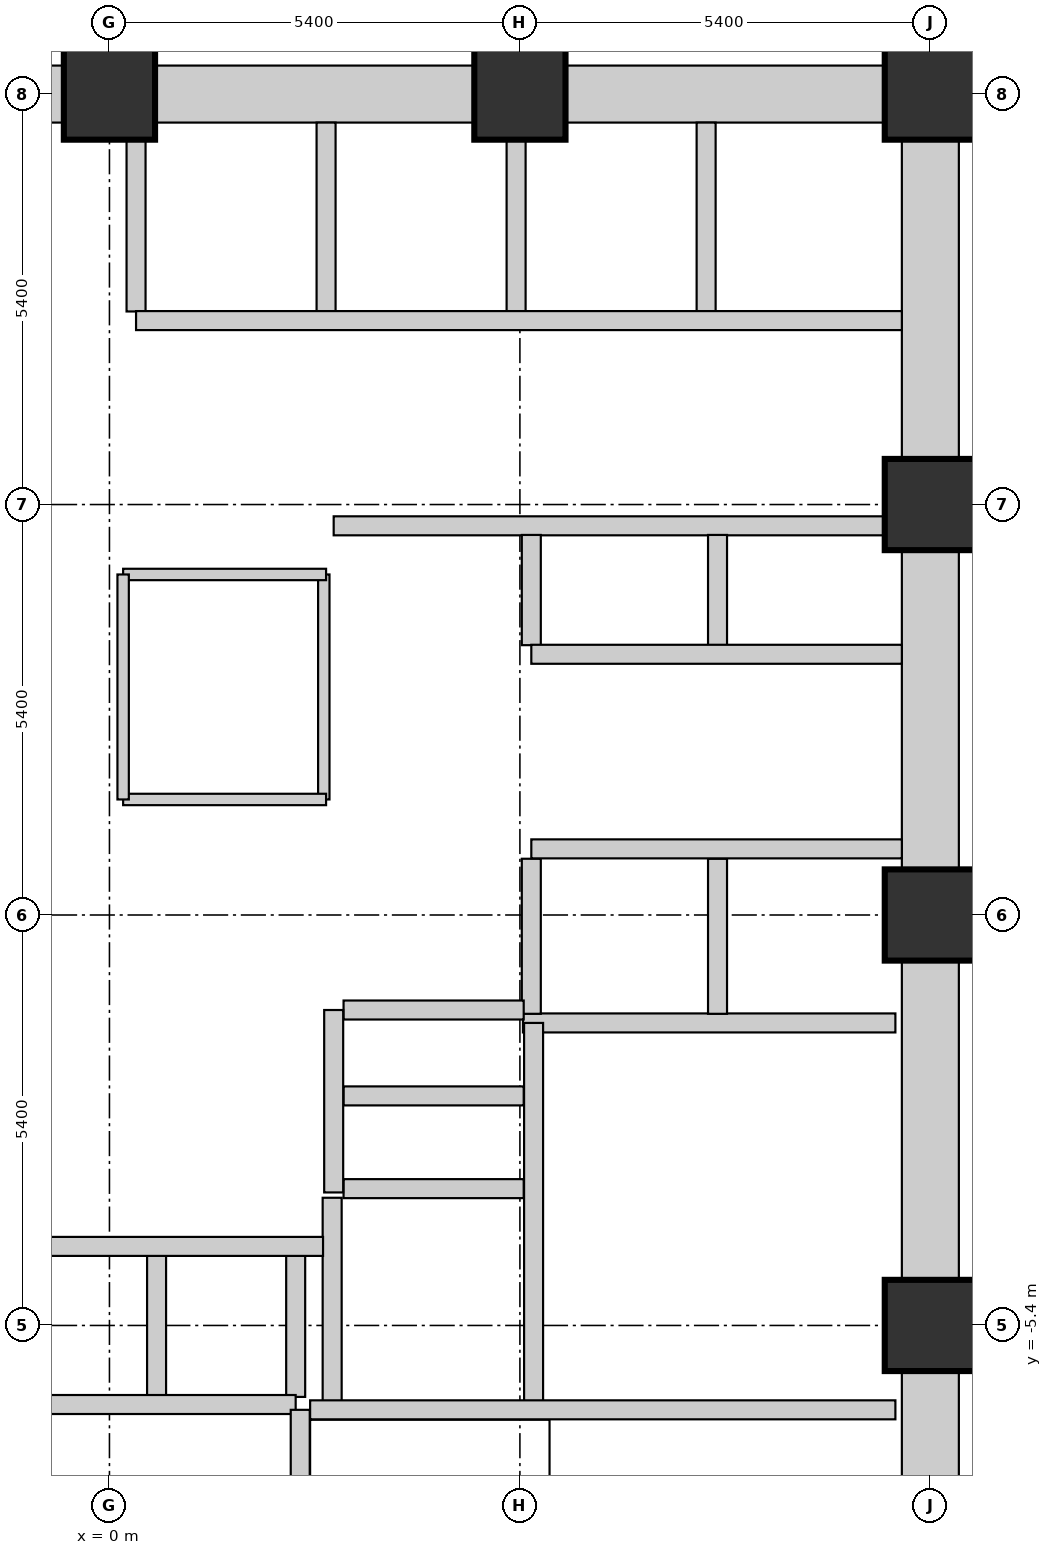
"""IFC4 building model, lengths in metres.
Left out: names, types, materials, properties, quantities, classifications, styles, units other than length and angle.
Written with IfcOpenShell. Run it as: python <this file> out.ifc"""

import sys

from ifc_helpers import new_model, si_unit, direction, frame, frame_2d, origin, origin_2d, place, context, subcontext, project, spatial, rectangle, extrude, element, fill, save


model = new_model("IFC4")
c1 = context("Model", 3, precision=1e-05, world=origin(), true_north=direction((0.0, 1.0)))
c2 = subcontext(c1, "Body", "Model", "MODEL_VIEW")
j1 = project(units=[si_unit("LENGTHUNIT", "METRE"), si_unit("PLANEANGLEUNIT", "RADIAN")], contexts=[c1])
p1 = place(None, origin())
s1 = spatial("IfcSite", under=j1, at=p1, CompositionType="ELEMENT")
p2 = place(p1, origin())
s2 = spatial("IfcBuilding", under=s1, at=p2, CompositionType="ELEMENT")
p3 = place(p2, frame((0.0, 0.0, 22.5)))
s3 = spatial("IfcBuildingStorey", under=s2, at=p3, CompositionType="ELEMENT", Elevation=22.5)
for number, where, z_axis, x_axis in (
    (1, (0.0, 10.8, 0.0), (0.0, 0.0, 1.0), (1.0, 0.0, 0.0)),
    (2, (5.4, 10.8, 0.0), (0.0, 0.0, 1.0), (1.0, 0.0, 0.0)),
    (3, (10.8, -5.4, 0.0), (0.0, 0.0, 1.0), (1.0, 0.0, 0.0)),
    (4, (10.8, 0.0, 0.0), (0.0, 0.0, 1.0), (1.0, 0.0, 0.0)),
    (5, (10.8, 5.4, 0.0), (0.0, 0.0, 1.0), (1.0, 0.0, 0.0)),
    (6, (10.8, 10.8, 0.0), (0.0, 0.0, 1.0), (1.0, 0.0, 0.0)),
):
    element("IfcColumn", number, at=place(p3, frame(where, z_axis=z_axis, x_axis=x_axis)), inside=s3, PredefinedType="COLUMN", context=c2, shape_type="SweptSolid", body=[
        extrude(rectangle(XDim=1.2, YDim=1.2, at=origin_2d()), origin(), (0.0, 0.0, 1.0), 3.75),
    ])
p4 = place(p3, frame((10.8, -10.19, 0.0), z_axis=(0.0, 0.0, 1.0), x_axis=(0.0, 1.0, 0.0)))
e7 = element("IfcWall", 7, at=p4, inside=s3, PredefinedType="SHEAR", context=c2, shape_type="SweptSolid", body=[
    extrude(rectangle(XDim=4.18, YDim=0.75, at=frame_2d((2.09, 0.0))), origin(), (0.0, 0.0, 1.0), 3.75),
])
p5 = place(p3, frame((-4.79, 10.8, 0.0), z_axis=(0.0, 0.0, 1.0), x_axis=(1.0, 0.0, 0.0)))
e8 = element("IfcWall", 8, at=p5, inside=s3, PredefinedType="SHEAR", context=c2, shape_type="SweptSolid", body=[
    extrude(rectangle(XDim=4.18, YDim=0.75, at=frame_2d((2.09, 0.0))), origin(), (0.0, 0.0, 1.0), 3.75),
])
p6 = place(p5, frame((2.83, 0.0, 0.0)))
e9 = element("IfcOpeningElement", 9, at=p6, cuts=e8, PredefinedType="OPENING", context=c2, shape_type="SweptSolid", body=[
    extrude(rectangle(XDim=1.1, YDim=2.1, at=frame_2d((0.55, 1.05))), frame((0.0, 0.385, 0.0), z_axis=(0.0, -1.0, 0.0), x_axis=(1.0, 0.0, 0.0)), (0.0, 0.0, 1.0), 0.77),
])
p7 = place(p3, frame((10.8, -4.79, 0.0), z_axis=(0.0, 0.0, 1.0), x_axis=(0.0, 1.0, 0.0)))
e10 = element("IfcWall", 10, at=p7, inside=s3, PredefinedType="SHEAR", context=c2, shape_type="SweptSolid", body=[
    extrude(rectangle(XDim=4.18, YDim=0.75, at=frame_2d((2.09, 0.0))), origin(), (0.0, 0.0, 1.0), 3.75),
])
p8 = place(p7, frame((1.54, 0.0, 0.0)))
e11 = element("IfcOpeningElement", 11, at=p8, cuts=e10, PredefinedType="OPENING", context=c2, shape_type="SweptSolid", body=[
    extrude(rectangle(XDim=1.1, YDim=2.1, at=frame_2d((0.55, 1.05))), frame((0.0, 0.385, 0.0), z_axis=(0.0, -1.0, 0.0), x_axis=(1.0, 0.0, 0.0)), (0.0, 0.0, 1.0), 0.77),
])
p9 = place(p3, frame((0.61, 10.8, 0.0), z_axis=(0.0, 0.0, 1.0), x_axis=(1.0, 0.0, 0.0)))
e12 = element("IfcWall", 12, at=p9, inside=s3, PredefinedType="SHEAR", context=c2, shape_type="SweptSolid", body=[
    extrude(rectangle(XDim=4.18, YDim=0.75, at=frame_2d((2.09, 0.0))), origin(), (0.0, 0.0, 1.0), 3.75),
])
p10 = place(p3, frame((10.8, 0.61, 0.0), z_axis=(0.0, 0.0, 1.0), x_axis=(0.0, 1.0, 0.0)))
e13 = element("IfcWall", 13, at=p10, inside=s3, PredefinedType="SHEAR", context=c2, shape_type="SweptSolid", body=[
    extrude(rectangle(XDim=4.18, YDim=0.75, at=frame_2d((2.09, 0.0))), origin(), (0.0, 0.0, 1.0), 3.75),
])
p11 = place(p10, frame((1.54, 0.0, 0.0)))
e14 = element("IfcOpeningElement", 14, at=p11, cuts=e13, PredefinedType="OPENING", context=c2, shape_type="SweptSolid", body=[
    extrude(rectangle(XDim=1.1, YDim=2.1, at=frame_2d((0.55, 1.05))), frame((0.0, 0.385, 0.0), z_axis=(0.0, -1.0, 0.0), x_axis=(1.0, 0.0, 0.0)), (0.0, 0.0, 1.0), 0.77),
])
for number, where, z_axis, x_axis in (
    (15, (6.01, 10.8, 0.0), (0.0, 0.0, 1.0), (1.0, 0.0, 0.0)),
    (16, (10.8, 6.01, 0.0), (0.0, 0.0, 1.0), (0.0, 1.0, 0.0)),
):
    element("IfcWall", number, at=place(p3, frame(where, z_axis=z_axis, x_axis=x_axis)), inside=s3, PredefinedType="SHEAR", context=c2, shape_type="SweptSolid", body=[
        extrude(rectangle(XDim=4.18, YDim=0.75, at=frame_2d((2.09, 0.0))), origin(), (0.0, 0.0, 1.0), 3.75),
    ])
p12 = place(p3, frame((2.93, -6.51, 0.0), z_axis=(0.0, 0.0, 1.0), x_axis=(0.0, 1.0, 0.0)))
e17 = element("IfcWall", 17, at=p12, inside=s3, PredefinedType="SHEAR", context=c2, shape_type="SweptSolid", body=[
    extrude(rectangle(XDim=2.79, YDim=0.25, at=frame_2d((1.395, 0.0))), origin(), (0.0, 0.0, 1.0), 3.75),
])
p13 = place(p3, frame((5.44, -1.42, 0.0), z_axis=(0.0, 0.0, 1.0), x_axis=(1.0, 0.0, 0.0)))
e18 = element("IfcWall", 18, at=p13, inside=s3, PredefinedType="SHEAR", context=c2, shape_type="SweptSolid", body=[
    extrude(rectangle(XDim=4.9, YDim=0.25, at=frame_2d((2.45, 0.0))), origin(), (0.0, 0.0, 1.0), 3.75),
])
p14 = place(p3, frame((3.08, -3.6, 0.0), z_axis=(0.0, 0.0, 1.0), x_axis=(1.0, 0.0, 0.0)))
e19 = element("IfcWall", 19, at=p14, inside=s3, PredefinedType="SHEAR", context=c2, shape_type="SweptSolid", body=[
    extrude(rectangle(XDim=2.37, YDim=0.25, at=frame_2d((1.185, 0.0))), origin(), (0.0, 0.0, 1.0), 3.75),
])
p15 = place(p3, frame((5.58, -6.51, 0.0), z_axis=(0.0, 0.0, 1.0), x_axis=(0.0, 1.0, 0.0)))
e20 = element("IfcWall", 20, at=p15, inside=s3, PredefinedType="SHEAR", context=c2, shape_type="SweptSolid", body=[
    extrude(rectangle(XDim=5.09, YDim=0.25, at=frame_2d((2.545, 0.0))), origin(), (0.0, 0.0, 1.0), 3.75),
])
p16 = place(p15, frame((0.85, 0.0, 0.0)))
e21 = element("IfcOpeningElement", 21, at=p16, cuts=e20, PredefinedType="OPENING", context=c2, shape_type="SweptSolid", body=[
    extrude(rectangle(XDim=1.1, YDim=2.1, at=frame_2d((0.55, 1.05))), frame((0.0, 0.135, 0.0), z_axis=(0.0, -1.0, 0.0), x_axis=(1.0, 0.0, 0.0)), (0.0, 0.0, 1.0), 0.27),
])
for number, where, z_axis, x_axis in (
    (22, (0.62, -6.34, 0.0), (0.0, 0.0, 1.0), (0.0, 1.0, 0.0)),
    (23, (2.45, -6.34, 0.0), (0.0, 0.0, 1.0), (0.0, 1.0, 0.0)),
):
    element("IfcWall", number, at=place(p3, frame(where, z_axis=z_axis, x_axis=x_axis)), inside=s3, PredefinedType="SHEAR", context=c2, shape_type="SweptSolid", body=[
        extrude(rectangle(XDim=1.88, YDim=0.25, at=frame_2d((0.94, 0.0))), origin(), (0.0, 0.0, 1.0), 3.75),
    ])
p17 = place(p3, frame((-1.22, -6.44, 0.0), z_axis=(0.0, 0.0, 1.0), x_axis=(1.0, 0.0, 0.0)))
e24 = element("IfcWall", 24, at=p17, inside=s3, PredefinedType="SHEAR", context=c2, shape_type="SweptSolid", body=[
    extrude(rectangle(XDim=3.67, YDim=0.25, at=frame_2d((1.835, 0.0))), origin(), (0.0, 0.0, 1.0), 3.75),
])
p18 = place(p3, frame((-1.22, -4.36, 0.0), z_axis=(0.0, 0.0, 1.0), x_axis=(1.0, 0.0, 0.0)))
e25 = element("IfcWall", 25, at=p18, inside=s3, PredefinedType="SHEAR", context=c2, shape_type="SweptSolid", body=[
    extrude(rectangle(XDim=4.03, YDim=0.25, at=frame_2d((2.015, 0.0))), origin(), (0.0, 0.0, 1.0), 3.75),
])
p19 = place(p3, frame((2.85, 7.94, 0.0), z_axis=(0.0, 0.0, 1.0), x_axis=(0.0, 1.0, 0.0)))
e26 = element("IfcWall", 26, at=p19, inside=s3, PredefinedType="SHEAR", context=c2, shape_type="SweptSolid", body=[
    extrude(rectangle(XDim=2.485, YDim=0.25, at=frame_2d((1.243, 0.0))), origin(), (0.0, 0.0, 1.0), 3.75),
])
for number, where, z_axis, x_axis in (
    (27, (0.35, 7.94, 0.0), (0.0, 0.0, 1.0), (0.0, 1.0, 0.0)),
    (28, (5.35, 7.94, 0.0), (0.0, 0.0, 1.0), (0.0, 1.0, 0.0)),
):
    element("IfcWall", number, at=place(p3, frame(where, z_axis=z_axis, x_axis=x_axis)), inside=s3, PredefinedType="SHEAR", context=c2, shape_type="SweptSolid", body=[
        extrude(rectangle(XDim=2.26, YDim=0.25, at=frame_2d((1.13, 0.0))), origin(), (0.0, 0.0, 1.0), 3.75),
    ])
p20 = place(p3, frame((7.85, 7.94, 0.0), z_axis=(0.0, 0.0, 1.0), x_axis=(0.0, 1.0, 0.0)))
e29 = element("IfcWall", 29, at=p20, inside=s3, PredefinedType="SHEAR", context=c2, shape_type="SweptSolid", body=[
    extrude(rectangle(XDim=2.485, YDim=0.25, at=frame_2d((1.243, 0.0))), origin(), (0.0, 0.0, 1.0), 3.75),
])
p21 = place(p3, frame((0.35, 7.82, 0.0), z_axis=(0.0, 0.0, 1.0), x_axis=(1.0, 0.0, 0.0)))
e30 = element("IfcWall", 30, at=p21, inside=s3, PredefinedType="SHEAR", context=c2, shape_type="SweptSolid", body=[
    extrude(rectangle(XDim=10.075, YDim=0.25, at=frame_2d((5.038, 0.0))), origin(), (0.0, 0.0, 1.0), 3.75),
])
p22 = place(p21, frame((0.7, 0.0, 0.0)))
e31 = element("IfcOpeningElement", 31, at=p22, cuts=e30, PredefinedType="OPENING", context=c2, shape_type="SweptSolid", body=[
    extrude(rectangle(XDim=1.1, YDim=2.1, at=frame_2d((0.55, 1.05))), frame((0.0, 0.135, 0.0), z_axis=(0.0, -1.0, 0.0), x_axis=(1.0, 0.0, 0.0)), (0.0, 0.0, 1.0), 0.27),
])
p23 = place(p21, frame((3.2, 0.0, 0.0)))
e32 = element("IfcOpeningElement", 32, at=p23, cuts=e30, PredefinedType="OPENING", context=c2, shape_type="SweptSolid", body=[
    extrude(rectangle(XDim=1.1, YDim=2.1, at=frame_2d((0.55, 1.05))), frame((0.0, 0.135, 0.0), z_axis=(0.0, -1.0, 0.0), x_axis=(1.0, 0.0, 0.0)), (0.0, 0.0, 1.0), 0.27),
])
p24 = place(p21, frame((5.7, 0.0, 0.0)))
e33 = element("IfcOpeningElement", 33, at=p24, cuts=e30, PredefinedType="OPENING", context=c2, shape_type="SweptSolid", body=[
    extrude(rectangle(XDim=1.1, YDim=2.1, at=frame_2d((0.55, 1.05))), frame((0.0, 0.135, 0.0), z_axis=(0.0, -1.0, 0.0), x_axis=(1.0, 0.0, 0.0)), (0.0, 0.0, 1.0), 0.27),
])
p25 = place(p21, frame((8.2, 0.0, 0.0)))
e34 = element("IfcOpeningElement", 34, at=p25, cuts=e30, PredefinedType="OPENING", context=c2, shape_type="SweptSolid", body=[
    extrude(rectangle(XDim=1.1, YDim=2.1, at=frame_2d((0.55, 1.05))), frame((0.0, 0.135, 0.0), z_axis=(0.0, -1.0, 0.0), x_axis=(1.0, 0.0, 0.0)), (0.0, 0.0, 1.0), 0.27),
])
p26 = place(p3, frame((2.95, 5.12, 0.0), z_axis=(0.0, 0.0, 1.0), x_axis=(1.0, 0.0, 0.0)))
e35 = element("IfcWall", 35, at=p26, inside=s3, PredefinedType="SHEAR", context=c2, shape_type="SweptSolid", body=[
    extrude(rectangle(XDim=7.25, YDim=0.25, at=frame_2d((3.625, 0.0))), origin(), (0.0, 0.0, 1.0), 3.75),
])
for number, where, z_axis, x_axis in (
    (36, (5.55, 3.55, 0.0), (0.0, 0.0, 1.0), (0.0, 1.0, 0.0)),
    (37, (8.0, 3.55, 0.0), (0.0, 0.0, 1.0), (0.0, 1.0, 0.0)),
):
    element("IfcWall", number, at=place(p3, frame(where, z_axis=z_axis, x_axis=x_axis)), inside=s3, PredefinedType="SHEAR", context=c2, shape_type="SweptSolid", body=[
        extrude(rectangle(XDim=1.45, YDim=0.25, at=frame_2d((0.725, 0.0))), origin(), (0.0, 0.0, 1.0), 3.75),
    ])
for number, where, z_axis, x_axis in (
    (38, (5.55, -1.3, 0.0), (0.0, 0.0, 1.0), (0.0, 1.0, 0.0)),
    (39, (8.0, -1.3, 0.0), (0.0, 0.0, 1.0), (0.0, 1.0, 0.0)),
):
    element("IfcWall", number, at=place(p3, frame(where, z_axis=z_axis, x_axis=x_axis)), inside=s3, PredefinedType="SHEAR", context=c2, shape_type="SweptSolid", body=[
        extrude(rectangle(XDim=2.04, YDim=0.25, at=frame_2d((1.02, 0.0))), origin(), (0.0, 0.0, 1.0), 3.75),
    ])
for number, where, z_axis, x_axis in (
    (40, (5.55, 3.43, 0.0), (0.0, 0.0, 1.0), (1.0, 0.0, 0.0)),
    (41, (5.55, 0.87, 0.0), (0.0, 0.0, 1.0), (1.0, 0.0, 0.0)),
):
    element("IfcWall", number, at=place(p3, frame(where, z_axis=z_axis, x_axis=x_axis)), inside=s3, PredefinedType="SHEAR", context=c2, shape_type="SweptSolid", body=[
        extrude(rectangle(XDim=4.875, YDim=0.25, at=frame_2d((2.438, 0.0))), origin(), (0.0, 0.0, 1.0), 3.75),
    ])
for number, where, z_axis, x_axis in (
    (42, (3.08, -2.38, 0.0), (0.0, 0.0, 1.0), (1.0, 0.0, 0.0)),
    (43, (3.08, -1.25, 0.0), (0.0, 0.0, 1.0), (1.0, 0.0, 0.0)),
):
    element("IfcWall", number, at=place(p3, frame(where, z_axis=z_axis, x_axis=x_axis)), inside=s3, PredefinedType="SHEAR", context=c2, shape_type="SweptSolid", body=[
        extrude(rectangle(XDim=2.37, YDim=0.25, at=frame_2d((1.185, 0.0))), origin(), (0.0, 0.0, 1.0), 3.75),
    ])
p27 = place(p3, frame((2.95, -3.65, 0.0), z_axis=(0.0, 0.0, 1.0), x_axis=(0.0, 1.0, 0.0)))
e44 = element("IfcWall", 44, at=p27, inside=s3, PredefinedType="SHEAR", context=c2, shape_type="SweptSolid", body=[
    extrude(rectangle(XDim=2.4, YDim=0.25, at=frame_2d((1.2, 0.0))), origin(), (0.0, 0.0, 1.0), 3.75),
])
p28 = place(p27, frame((0.775, 0.0, 0.0)))
e45 = element("IfcOpeningElement", 45, at=p28, cuts=e44, PredefinedType="OPENING", context=c2, shape_type="SweptSolid", body=[
    extrude(rectangle(XDim=0.85, YDim=2.1, at=frame_2d((0.425, 1.05))), frame((0.0, 0.135, 0.0), z_axis=(0.0, -1.0, 0.0), x_axis=(1.0, 0.0, 0.0)), (0.0, 0.0, 1.0), 0.27),
])
p29 = place(p3, frame((2.64, -6.51, 0.0), z_axis=(0.0, 0.0, 1.0), x_axis=(1.0, 0.0, 0.0)))
e46 = element("IfcWall", 46, at=p29, inside=s3, PredefinedType="SHEAR", context=c2, shape_type="SweptSolid", body=[
    extrude(rectangle(XDim=7.7, YDim=0.25, at=frame_2d((3.85, 0.0))), origin(), (0.0, 0.0, 1.0), 3.75),
])
p30 = place(p29, frame((6.0, 0.0, 0.0)))
e47 = element("IfcOpeningElement", 47, at=p30, cuts=e46, PredefinedType="OPENING", context=c2, shape_type="SweptSolid", body=[
    extrude(rectangle(XDim=0.95, YDim=2.1, at=frame_2d((0.475, 1.05))), frame((0.0, 0.135, 0.0), z_axis=(0.0, -1.0, 0.0), x_axis=(1.0, 0.0, 0.0)), (0.0, 0.0, 1.0), 0.27),
])
p31 = place(p3, frame((2.51, -10.425, 0.0), z_axis=(0.0, 0.0, 1.0), x_axis=(0.0, 1.0, 0.0)))
e48 = element("IfcWall", 48, at=p31, inside=s3, PredefinedType="SHEAR", context=c2, shape_type="SweptSolid", body=[
    extrude(rectangle(XDim=3.915, YDim=0.25, at=frame_2d((1.958, 0.0))), origin(), (0.0, 0.0, 1.0), 3.75),
])
p32 = place(p3, frame((2.82, 1.52, 0.0), z_axis=(0.0, 0.0, 1.0), x_axis=(0.0, 1.0, 0.0)))
e49 = element("IfcWall", 49, at=p32, inside=s3, PredefinedType="PARTITIONING", context=c2, shape_type="SweptSolid", body=[
    extrude(rectangle(XDim=2.96, YDim=0.15, at=frame_2d((1.48, 0.0))), origin(), (0.0, 0.0, 1.0), 3.57),
])
for number, where, z_axis, x_axis in (
    (50, (0.18, 4.48, 0.0), (0.0, 0.0, 1.0), (1.0, 0.0, 0.0)),
    (51, (0.18, 1.52, 0.0), (0.0, 0.0, 1.0), (1.0, 0.0, 0.0)),
):
    element("IfcWall", number, at=place(p3, frame(where, z_axis=z_axis, x_axis=x_axis)), inside=s3, PredefinedType="PARTITIONING", context=c2, shape_type="SweptSolid", body=[
        extrude(rectangle(XDim=2.67, YDim=0.15, at=frame_2d((1.335, 0.0))), origin(), (0.0, 0.0, 1.0), 3.57),
    ])
p33 = place(p3, frame((0.18, 1.52, 0.0), z_axis=(0.0, 0.0, 1.0), x_axis=(0.0, 1.0, 0.0)))
e52 = element("IfcWall", 52, at=p33, inside=s3, PredefinedType="PARTITIONING", context=c2, shape_type="SweptSolid", body=[
    extrude(rectangle(XDim=2.96, YDim=0.15, at=frame_2d((1.48, 0.0))), origin(), (0.0, 0.0, 1.0), 3.57),
])
p34 = place(p33, frame((0.95, 0.0, 0.0)))
e53 = element("IfcOpeningElement", 53, at=p34, cuts=e52, PredefinedType="OPENING", context=c2, shape_type="SweptSolid", body=[
    extrude(rectangle(XDim=0.85, YDim=2.1, at=frame_2d((0.425, 1.05))), frame((0.0, 0.085, 0.0), z_axis=(0.0, -1.0, 0.0), x_axis=(1.0, 0.0, 0.0)), (0.0, 0.0, 1.0), 0.17),
])
p35 = place(p34, origin())
e54 = element("IfcDoor", 54, at=p35, inside=s3, OperationType="SINGLE_SWING_RIGHT", PredefinedType="DOOR", context=c2, shape_type="SweptSolid", body=[
    extrude(rectangle(XDim=0.85, YDim=2.1, at=frame_2d((0.425, 1.05))), frame((0.0, 0.025, 0.0), z_axis=(0.0, -1.0, 0.0), x_axis=(1.0, 0.0, 0.0)), (0.0, 0.0, 1.0), 0.05),
])
fill(e53, e54)
p36 = place(p30, origin())
e55 = element("IfcDoor", 55, at=p36, inside=s3, OperationType="SINGLE_SWING_RIGHT", PredefinedType="DOOR", context=c2, shape_type="SweptSolid", body=[
    extrude(rectangle(XDim=0.95, YDim=2.1, at=frame_2d((0.475, 1.05))), frame((0.0, 0.025, 0.0), z_axis=(0.0, -1.0, 0.0), x_axis=(1.0, 0.0, 0.0)), (0.0, 0.0, 1.0), 0.05),
])
fill(e47, e55)
p37 = place(p28, origin())
e56 = element("IfcDoor", 56, at=p37, inside=s3, OperationType="SINGLE_SWING_LEFT", PredefinedType="DOOR", context=c2, shape_type="SweptSolid", body=[
    extrude(rectangle(XDim=0.85, YDim=2.1, at=frame_2d((0.425, 1.05))), frame((0.0, 0.025, 0.0), z_axis=(0.0, -1.0, 0.0), x_axis=(1.0, 0.0, 0.0)), (0.0, 0.0, 1.0), 0.05),
])
fill(e45, e56)
p38 = place(p8, origin())
e57 = element("IfcDoor", 57, at=p38, inside=s3, OperationType="SINGLE_SWING_RIGHT", PredefinedType="DOOR", context=c2, shape_type="SweptSolid", body=[
    extrude(rectangle(XDim=1.1, YDim=2.1, at=frame_2d((0.55, 1.05))), frame((0.0, 0.025, 0.0), z_axis=(0.0, -1.0, 0.0), x_axis=(1.0, 0.0, 0.0)), (0.0, 0.0, 1.0), 0.05),
])
fill(e11, e57)
p39 = place(p16, origin())
e58 = element("IfcDoor", 58, at=p39, inside=s3, OperationType="SLIDING_TO_RIGHT", PredefinedType="DOOR", context=c2, shape_type="SweptSolid", body=[
    extrude(rectangle(XDim=1.1, YDim=2.1, at=frame_2d((0.55, 1.05))), frame((0.0, 0.025, 0.0), z_axis=(0.0, -1.0, 0.0), x_axis=(1.0, 0.0, 0.0)), (0.0, 0.0, 1.0), 0.05),
])
fill(e21, e58)
p40 = place(p22, origin())
e59 = element("IfcDoor", 59, at=p40, inside=s3, OperationType="SLIDING_TO_LEFT", PredefinedType="DOOR", context=c2, shape_type="SweptSolid", body=[
    extrude(rectangle(XDim=1.1, YDim=2.1, at=frame_2d((0.55, 1.05))), frame((0.0, 0.025, 0.0), z_axis=(0.0, -1.0, 0.0), x_axis=(1.0, 0.0, 0.0)), (0.0, 0.0, 1.0), 0.05),
])
fill(e31, e59)
p41 = place(p23, origin())
e60 = element("IfcDoor", 60, at=p41, inside=s3, OperationType="SLIDING_TO_LEFT", PredefinedType="DOOR", context=c2, shape_type="SweptSolid", body=[
    extrude(rectangle(XDim=1.1, YDim=2.1, at=frame_2d((0.55, 1.05))), frame((0.0, 0.025, 0.0), z_axis=(0.0, -1.0, 0.0), x_axis=(1.0, 0.0, 0.0)), (0.0, 0.0, 1.0), 0.05),
])
fill(e32, e60)
p42 = place(p24, origin())
e61 = element("IfcDoor", 61, at=p42, inside=s3, OperationType="SLIDING_TO_LEFT", PredefinedType="DOOR", context=c2, shape_type="SweptSolid", body=[
    extrude(rectangle(XDim=1.1, YDim=2.1, at=frame_2d((0.55, 1.05))), frame((0.0, 0.025, 0.0), z_axis=(0.0, -1.0, 0.0), x_axis=(1.0, 0.0, 0.0)), (0.0, 0.0, 1.0), 0.05),
])
fill(e33, e61)
p43 = place(p25, origin())
e62 = element("IfcDoor", 62, at=p43, inside=s3, OperationType="SLIDING_TO_LEFT", PredefinedType="DOOR", context=c2, shape_type="SweptSolid", body=[
    extrude(rectangle(XDim=1.1, YDim=2.1, at=frame_2d((0.55, 1.05))), frame((0.0, 0.025, 0.0), z_axis=(0.0, -1.0, 0.0), x_axis=(1.0, 0.0, 0.0)), (0.0, 0.0, 1.0), 0.05),
])
fill(e34, e62)
p44 = place(p11, origin())
e63 = element("IfcDoor", 63, at=p44, inside=s3, OperationType="SINGLE_SWING_LEFT", PredefinedType="DOOR", context=c2, shape_type="SweptSolid", body=[
    extrude(rectangle(XDim=1.1, YDim=2.1, at=frame_2d((0.55, 1.05))), frame((0.0, 0.025, 0.0), z_axis=(0.0, -1.0, 0.0), x_axis=(1.0, 0.0, 0.0)), (0.0, 0.0, 1.0), 0.05),
])
fill(e14, e63)
save(model, sys.argv[1])
